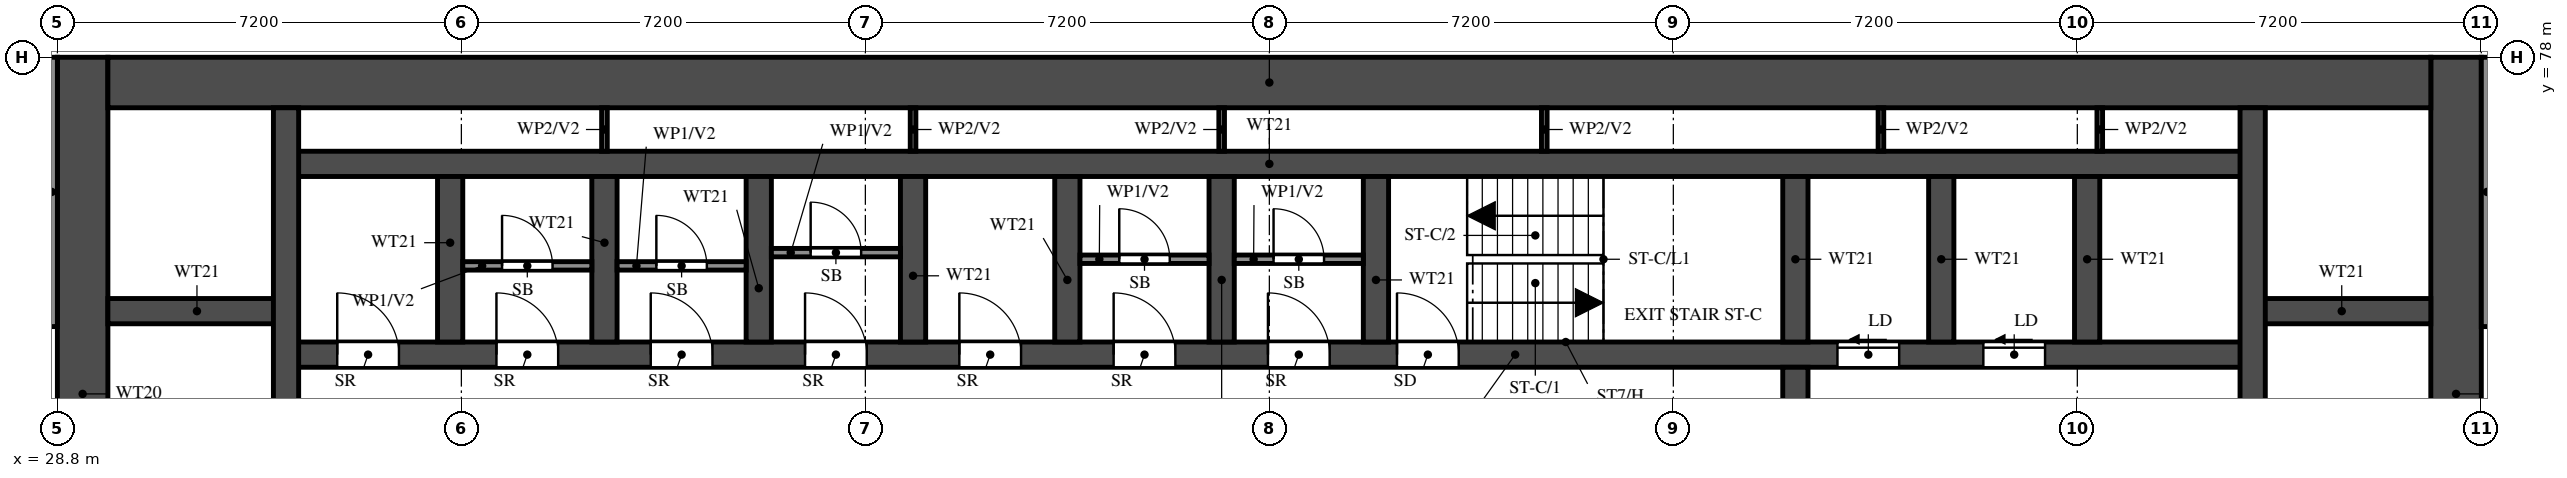
"""IFC4 building model, lengths in metres.
Left out: names, types, materials, properties, quantities, classifications, styles, units other than length and angle.
Written with IfcOpenShell. Run it as: python <this file> out.ifc"""

import sys

from ifc_helpers import new_model, si_unit, direction, frame, frame_2d, origin, place, context, subcontext, project, spatial, rectangle, extrude, element, fill, save


model = new_model("IFC4")
c1 = context("Model", 3, precision=1e-05, world=origin(), true_north=direction((0.0, 1.0)))
c2 = subcontext(c1, "Body", "Model", "MODEL_VIEW")
j1 = project(units=[si_unit("LENGTHUNIT", "METRE"), si_unit("PLANEANGLEUNIT", "RADIAN")], contexts=[c1])
p1 = place(None, origin())
s1 = spatial("IfcSite", under=j1, at=p1, CompositionType="ELEMENT")
p2 = place(p1, origin())
s2 = spatial("IfcBuilding", under=s1, at=p2, CompositionType="ELEMENT")
p3 = place(p2, frame((0.0, 0.0, 51.5)))
s3 = spatial("IfcBuildingStorey", under=s2, at=p3, CompositionType="ELEMENT", Elevation=51.5)
for number, where, z_axis, x_axis in (
    (1, (29.25, 66.0, 0.0), (0.0, 0.0, 1.0), (0.0, 1.0, 0.0)),
    (2, (71.55, 66.0, 0.0), (0.0, 0.0, 1.0), (0.0, 1.0, 0.0)),
):
    element("IfcWall", number, at=place(p3, frame(where, z_axis=z_axis, x_axis=x_axis)), inside=s3, PredefinedType="SHEAR", context=c2, shape_type="SweptSolid", body=[
        extrude(rectangle(XDim=12.0, YDim=0.9, at=frame_2d((6.0, 0.0))), origin(), (0.0, 0.0, 1.0), 3.18),
    ])
p4 = place(p3, frame((29.7, 77.55, 0.0), z_axis=(0.0, 0.0, 1.0), x_axis=(1.0, 0.0, 0.0)))
e3 = element("IfcWall", 3, at=p4, inside=s3, PredefinedType="SHEAR", context=c2, shape_type="SweptSolid", body=[
    extrude(rectangle(XDim=41.4, YDim=0.9, at=frame_2d((20.7, 0.0))), origin(), (0.0, 0.0, 1.0), 3.18),
])
p5 = place(p3, frame((32.875, 72.7, 0.0), z_axis=(0.0, 0.0, 1.0), x_axis=(1.0, 0.0, 0.0)))
e4 = element("IfcWall", 4, at=p5, inside=s3, PredefinedType="SHEAR", context=c2, shape_type="SweptSolid", body=[
    extrude(rectangle(XDim=35.05, YDim=0.45, at=frame_2d((17.525, 0.0))), origin(), (0.0, 0.0, 1.0), 3.18),
])
p6 = place(p5, frame((19.8, 0.0, 0.0)))
e5 = element("IfcOpeningElement", 5, at=p6, cuts=e4, PredefinedType="OPENING", context=c2, shape_type="SweptSolid", body=[
    extrude(rectangle(XDim=1.1, YDim=2.1, at=frame_2d((0.55, 1.05))), frame((0.0, 0.235, 0.0), z_axis=(0.0, -1.0, 0.0), x_axis=(1.0, 0.0, 0.0)), (0.0, 0.0, 1.0), 0.47),
])
p7 = place(p5, frame((27.65, 0.0, 0.0)))
e6 = element("IfcOpeningElement", 6, at=p7, cuts=e4, PredefinedType="OPENING", context=c2, shape_type="SweptSolid", body=[
    extrude(rectangle(XDim=1.1, YDim=2.1, at=frame_2d((0.55, 1.05))), frame((0.0, 0.235, 0.0), z_axis=(0.0, -1.0, 0.0), x_axis=(1.0, 0.0, 0.0)), (0.0, 0.0, 1.0), 0.47),
])
p8 = place(p5, frame((30.25, 0.0, 0.0)))
e7 = element("IfcOpeningElement", 7, at=p8, cuts=e4, PredefinedType="OPENING", context=c2, shape_type="SweptSolid", body=[
    extrude(rectangle(XDim=1.1, YDim=2.1, at=frame_2d((0.55, 1.05))), frame((0.0, 0.235, 0.0), z_axis=(0.0, -1.0, 0.0), x_axis=(1.0, 0.0, 0.0)), (0.0, 0.0, 1.0), 0.47),
])
p9 = place(p5, frame((3.75, 0.0, 0.0)))
e8 = element("IfcOpeningElement", 8, at=p9, cuts=e4, PredefinedType="OPENING", context=c2, shape_type="SweptSolid", body=[
    extrude(rectangle(XDim=1.1, YDim=2.1, at=frame_2d((0.55, 1.05))), frame((0.0, 0.235, 0.0), z_axis=(0.0, -1.0, 0.0), x_axis=(1.0, 0.0, 0.0)), (0.0, 0.0, 1.0), 0.47),
])
p10 = place(p5, frame((6.5, 0.0, 0.0)))
e9 = element("IfcOpeningElement", 9, at=p10, cuts=e4, PredefinedType="OPENING", context=c2, shape_type="SweptSolid", body=[
    extrude(rectangle(XDim=1.1, YDim=2.1, at=frame_2d((0.55, 1.05))), frame((0.0, 0.235, 0.0), z_axis=(0.0, -1.0, 0.0), x_axis=(1.0, 0.0, 0.0)), (0.0, 0.0, 1.0), 0.47),
])
p11 = place(p5, frame((9.25, 0.0, 0.0)))
e10 = element("IfcOpeningElement", 10, at=p11, cuts=e4, PredefinedType="OPENING", context=c2, shape_type="SweptSolid", body=[
    extrude(rectangle(XDim=1.1, YDim=2.1, at=frame_2d((0.55, 1.05))), frame((0.0, 0.235, 0.0), z_axis=(0.0, -1.0, 0.0), x_axis=(1.0, 0.0, 0.0)), (0.0, 0.0, 1.0), 0.47),
])
p12 = place(p5, frame((12.0, 0.0, 0.0)))
e11 = element("IfcOpeningElement", 11, at=p12, cuts=e4, PredefinedType="OPENING", context=c2, shape_type="SweptSolid", body=[
    extrude(rectangle(XDim=1.1, YDim=2.1, at=frame_2d((0.55, 1.05))), frame((0.0, 0.235, 0.0), z_axis=(0.0, -1.0, 0.0), x_axis=(1.0, 0.0, 0.0)), (0.0, 0.0, 1.0), 0.47),
])
p13 = place(p5, frame((14.75, 0.0, 0.0)))
e12 = element("IfcOpeningElement", 12, at=p13, cuts=e4, PredefinedType="OPENING", context=c2, shape_type="SweptSolid", body=[
    extrude(rectangle(XDim=1.1, YDim=2.1, at=frame_2d((0.55, 1.05))), frame((0.0, 0.235, 0.0), z_axis=(0.0, -1.0, 0.0), x_axis=(1.0, 0.0, 0.0)), (0.0, 0.0, 1.0), 0.47),
])
p14 = place(p5, frame((17.5, 0.0, 0.0)))
e13 = element("IfcOpeningElement", 13, at=p14, cuts=e4, PredefinedType="OPENING", context=c2, shape_type="SweptSolid", body=[
    extrude(rectangle(XDim=1.1, YDim=2.1, at=frame_2d((0.55, 1.05))), frame((0.0, 0.235, 0.0), z_axis=(0.0, -1.0, 0.0), x_axis=(1.0, 0.0, 0.0)), (0.0, 0.0, 1.0), 0.47),
])
p15 = place(p5, frame((0.913, 0.0, 0.0)))
e14 = element("IfcOpeningElement", 14, at=p15, cuts=e4, PredefinedType="OPENING", context=c2, shape_type="SweptSolid", body=[
    extrude(rectangle(XDim=1.1, YDim=2.1, at=frame_2d((0.55, 1.05))), frame((0.0, 0.235, 0.0), z_axis=(0.0, -1.0, 0.0), x_axis=(1.0, 0.0, 0.0)), (0.0, 0.0, 1.0), 0.47),
])
p16 = place(p3, frame((32.875, 76.1, 0.0), z_axis=(0.0, 0.0, 1.0), x_axis=(1.0, 0.0, 0.0)))
e15 = element("IfcWall", 15, at=p16, inside=s3, PredefinedType="SHEAR", context=c2, shape_type="SweptSolid", body=[
    extrude(rectangle(XDim=35.05, YDim=0.45, at=frame_2d((17.525, 0.0))), origin(), (0.0, 0.0, 1.0), 3.18),
])
for number, where, z_axis, x_axis in (
    (16, (29.7, 73.475, 0.0), (0.0, 0.0, 1.0), (1.0, 0.0, 0.0)),
    (17, (67.925, 73.475, 0.0), (0.0, 0.0, 1.0), (1.0, 0.0, 0.0)),
):
    element("IfcWall", number, at=place(p3, frame(where, z_axis=z_axis, x_axis=x_axis)), inside=s3, PredefinedType="SHEAR", context=c2, shape_type="SweptSolid", body=[
        extrude(rectangle(XDim=3.175, YDim=0.45, at=frame_2d((1.587, 0.0))), origin(), (0.0, 0.0, 1.0), 3.18),
    ])
p17 = place(p3, frame((32.875, 66.45, 0.0), z_axis=(0.0, 0.0, 1.0), x_axis=(0.0, 1.0, 0.0)))
e18 = element("IfcWall", 18, at=p17, inside=s3, PredefinedType="SHEAR", context=c2, shape_type="SweptSolid", body=[
    extrude(rectangle(XDim=10.65, YDim=0.45, at=frame_2d((5.325, 0.0))), origin(), (0.0, 0.0, 1.0), 3.18),
])
p18 = place(p3, frame((67.925, 66.45, 0.0), z_axis=(0.0, 0.0, 1.0), x_axis=(0.0, 1.0, 0.0)))
e19 = element("IfcWall", 19, at=p18, inside=s3, PredefinedType="SHEAR", context=c2, shape_type="SweptSolid", body=[
    extrude(rectangle(XDim=10.65, YDim=0.45, at=frame_2d((5.325, 0.0))), origin(), (0.0, 0.0, 1.0), 3.18),
])
p19 = place(p18, frame((0.15, 0.0, 0.0)))
e20 = element("IfcOpeningElement", 20, at=p19, cuts=e19, PredefinedType="OPENING", context=c2, shape_type="SweptSolid", body=[
    extrude(rectangle(XDim=1.1, YDim=2.1, at=frame_2d((0.55, 1.05))), frame((0.0, 0.235, 0.0), z_axis=(0.0, -1.0, 0.0), x_axis=(1.0, 0.0, 0.0)), (0.0, 0.0, 1.0), 0.47),
])
p20 = place(p3, frame((59.775, 66.45, 0.0), z_axis=(0.0, 0.0, 1.0), x_axis=(0.0, 1.0, 0.0)))
e21 = element("IfcWall", 21, at=p20, inside=s3, PredefinedType="SHEAR", context=c2, shape_type="SweptSolid", body=[
    extrude(rectangle(XDim=6.025, YDim=0.45, at=frame_2d((3.013, 0.0))), origin(), (0.0, 0.0, 1.0), 3.18),
])
p21 = place(p20, frame((3.85, 0.0, 0.0)))
e22 = element("IfcOpeningElement", 22, at=p21, cuts=e21, PredefinedType="OPENING", context=c2, shape_type="SweptSolid", body=[
    extrude(rectangle(XDim=1.2, YDim=2.1, at=frame_2d((0.6, 1.05))), frame((0.0, 0.235, 0.0), z_axis=(0.0, -1.0, 0.0), x_axis=(1.0, 0.0, 0.0)), (0.0, 0.0, 1.0), 0.47),
])
for number, where, z_axis, x_axis in (
    (23, (59.775, 72.925, 0.0), (0.0, 0.0, 1.0), (0.0, 1.0, 0.0)),
    (24, (35.8, 72.925, 0.0), (0.0, 0.0, 1.0), (0.0, 1.0, 0.0)),
    (25, (38.55, 72.925, 0.0), (0.0, 0.0, 1.0), (0.0, 1.0, 0.0)),
    (26, (41.3, 72.925, 0.0), (0.0, 0.0, 1.0), (0.0, 1.0, 0.0)),
    (27, (44.05, 72.925, 0.0), (0.0, 0.0, 1.0), (0.0, 1.0, 0.0)),
    (28, (46.8, 72.925, 0.0), (0.0, 0.0, 1.0), (0.0, 1.0, 0.0)),
    (29, (49.55, 72.925, 0.0), (0.0, 0.0, 1.0), (0.0, 1.0, 0.0)),
    (30, (52.3, 72.925, 0.0), (0.0, 0.0, 1.0), (0.0, 1.0, 0.0)),
    (31, (62.375, 72.925, 0.0), (0.0, 0.0, 1.0), (0.0, 1.0, 0.0)),
    (32, (64.975, 72.925, 0.0), (0.0, 0.0, 1.0), (0.0, 1.0, 0.0)),
):
    element("IfcWall", number, at=place(p3, frame(where, z_axis=z_axis, x_axis=x_axis)), inside=s3, PredefinedType="SHEAR", context=c2, shape_type="SweptSolid", body=[
        extrude(rectangle(XDim=2.95, YDim=0.45, at=frame_2d((1.475, 0.0))), origin(), (0.0, 0.0, 1.0), 3.18),
    ])
p22 = place(p3, frame((36.025, 74.282, 0.0), z_axis=(0.0, 0.0, 1.0), x_axis=(1.0, 0.0, 0.0)))
e33 = element("IfcWall", 33, at=p22, inside=s3, PredefinedType="PARTITIONING", context=c2, shape_type="SweptSolid", body=[
    extrude(rectangle(XDim=2.3, YDim=0.15, at=frame_2d((1.15, 0.0))), origin(), (0.0, 0.0, 1.0), 3.18),
])
p23 = place(p22, frame((0.7, 0.0, 0.0)))
e34 = element("IfcOpeningElement", 34, at=p23, cuts=e33, PredefinedType="OPENING", context=c2, shape_type="SweptSolid", body=[
    extrude(rectangle(XDim=0.9, YDim=2.1, at=frame_2d((0.45, 1.05))), frame((0.0, 0.085, 0.0), z_axis=(0.0, -1.0, 0.0), x_axis=(1.0, 0.0, 0.0)), (0.0, 0.0, 1.0), 0.17),
])
p24 = place(p3, frame((38.775, 74.282, 0.0), z_axis=(0.0, 0.0, 1.0), x_axis=(1.0, 0.0, 0.0)))
e35 = element("IfcWall", 35, at=p24, inside=s3, PredefinedType="PARTITIONING", context=c2, shape_type="SweptSolid", body=[
    extrude(rectangle(XDim=2.3, YDim=0.15, at=frame_2d((1.15, 0.0))), origin(), (0.0, 0.0, 1.0), 3.18),
])
p25 = place(p24, frame((0.7, 0.0, 0.0)))
e36 = element("IfcOpeningElement", 36, at=p25, cuts=e35, PredefinedType="OPENING", context=c2, shape_type="SweptSolid", body=[
    extrude(rectangle(XDim=0.9, YDim=2.1, at=frame_2d((0.45, 1.05))), frame((0.0, 0.085, 0.0), z_axis=(0.0, -1.0, 0.0), x_axis=(1.0, 0.0, 0.0)), (0.0, 0.0, 1.0), 0.17),
])
p26 = place(p3, frame((41.525, 74.518, 0.0), z_axis=(0.0, 0.0, 1.0), x_axis=(1.0, 0.0, 0.0)))
e37 = element("IfcWall", 37, at=p26, inside=s3, PredefinedType="PARTITIONING", context=c2, shape_type="SweptSolid", body=[
    extrude(rectangle(XDim=2.3, YDim=0.15, at=frame_2d((1.15, 0.0))), origin(), (0.0, 0.0, 1.0), 3.18),
])
p27 = place(p26, frame((0.7, 0.0, 0.0)))
e38 = element("IfcOpeningElement", 38, at=p27, cuts=e37, PredefinedType="OPENING", context=c2, shape_type="SweptSolid", body=[
    extrude(rectangle(XDim=0.9, YDim=2.1, at=frame_2d((0.45, 1.05))), frame((0.0, 0.085, 0.0), z_axis=(0.0, -1.0, 0.0), x_axis=(1.0, 0.0, 0.0)), (0.0, 0.0, 1.0), 0.17),
])
p28 = place(p3, frame((47.025, 74.4, 0.0), z_axis=(0.0, 0.0, 1.0), x_axis=(1.0, 0.0, 0.0)))
e39 = element("IfcWall", 39, at=p28, inside=s3, PredefinedType="PARTITIONING", context=c2, shape_type="SweptSolid", body=[
    extrude(rectangle(XDim=2.3, YDim=0.15, at=frame_2d((1.15, 0.0))), origin(), (0.0, 0.0, 1.0), 3.18),
])
p29 = place(p28, frame((0.7, 0.0, 0.0)))
e40 = element("IfcOpeningElement", 40, at=p29, cuts=e39, PredefinedType="OPENING", context=c2, shape_type="SweptSolid", body=[
    extrude(rectangle(XDim=0.9, YDim=2.1, at=frame_2d((0.45, 1.05))), frame((0.0, 0.085, 0.0), z_axis=(0.0, -1.0, 0.0), x_axis=(1.0, 0.0, 0.0)), (0.0, 0.0, 1.0), 0.17),
])
p30 = place(p3, frame((49.775, 74.4, 0.0), z_axis=(0.0, 0.0, 1.0), x_axis=(1.0, 0.0, 0.0)))
e41 = element("IfcWall", 41, at=p30, inside=s3, PredefinedType="PARTITIONING", context=c2, shape_type="SweptSolid", body=[
    extrude(rectangle(XDim=2.3, YDim=0.15, at=frame_2d((1.15, 0.0))), origin(), (0.0, 0.0, 1.0), 3.18),
])
p31 = place(p30, frame((0.7, 0.0, 0.0)))
e42 = element("IfcOpeningElement", 42, at=p31, cuts=e41, PredefinedType="OPENING", context=c2, shape_type="SweptSolid", body=[
    extrude(rectangle(XDim=0.9, YDim=2.1, at=frame_2d((0.45, 1.05))), frame((0.0, 0.085, 0.0), z_axis=(0.0, -1.0, 0.0), x_axis=(1.0, 0.0, 0.0)), (0.0, 0.0, 1.0), 0.17),
])
for number, where, z_axis, x_axis in (
    (43, (38.55, 76.325, 0.0), (0.0, 0.0, 1.0), (0.0, 1.0, 0.0)),
    (44, (44.05, 76.325, 0.0), (0.0, 0.0, 1.0), (0.0, 1.0, 0.0)),
    (45, (49.55, 76.325, 0.0), (0.0, 0.0, 1.0), (0.0, 1.0, 0.0)),
    (46, (55.3, 76.325, 0.0), (0.0, 0.0, 1.0), (0.0, 1.0, 0.0)),
    (47, (61.3, 76.325, 0.0), (0.0, 0.0, 1.0), (0.0, 1.0, 0.0)),
    (48, (65.2, 76.325, 0.0), (0.0, 0.0, 1.0), (0.0, 1.0, 0.0)),
):
    element("IfcWall", number, at=place(p3, frame(where, z_axis=z_axis, x_axis=x_axis)), inside=s3, PredefinedType="PARTITIONING", context=c2, shape_type="SweptSolid", body=[
        extrude(rectangle(XDim=0.775, YDim=0.1, at=frame_2d((0.388, 0.0))), origin(), (0.0, 0.0, 1.0), 3.18),
    ])
for number, where, z_axis, x_axis in (
    (49, (28.7, 73.2, 0.0), (0.0, 0.0, 1.0), (0.0, 1.0, 0.0)),
    (50, (72.1, 73.2, 0.0), (0.0, 0.0, 1.0), (0.0, 1.0, 0.0)),
):
    element("IfcWall", number, at=place(p3, frame(where, z_axis=z_axis, x_axis=x_axis)), inside=s3, PredefinedType="SOLIDWALL", context=c2, shape_type="SweptSolid", body=[
        extrude(rectangle(XDim=4.8, YDim=0.2, at=frame_2d((2.4, 0.0))), origin(), (0.0, 0.0, 1.0), 3.18),
    ])
p32 = place(p6, origin())
e51 = element("IfcDoor", 51, at=p32, inside=s3, OperationType="SINGLE_SWING_LEFT", PredefinedType="DOOR", context=c2, shape_type="SweptSolid", body=[
    extrude(rectangle(XDim=1.1, YDim=2.1, at=frame_2d((0.55, 1.05))), frame((0.0, 0.025, 0.0), z_axis=(0.0, -1.0, 0.0), x_axis=(1.0, 0.0, 0.0)), (0.0, 0.0, 1.0), 0.05),
])
fill(e5, e51)
p33 = place(p7, origin())
e52 = element("IfcDoor", 52, at=p33, inside=s3, OperationType="SLIDING_TO_LEFT", PredefinedType="DOOR", context=c2, shape_type="SweptSolid", body=[
    extrude(rectangle(XDim=1.1, YDim=2.1, at=frame_2d((0.55, 1.05))), frame((0.0, 0.025, 0.0), z_axis=(0.0, -1.0, 0.0), x_axis=(1.0, 0.0, 0.0)), (0.0, 0.0, 1.0), 0.05),
])
fill(e6, e52)
p34 = place(p8, origin())
e53 = element("IfcDoor", 53, at=p34, inside=s3, OperationType="SLIDING_TO_LEFT", PredefinedType="DOOR", context=c2, shape_type="SweptSolid", body=[
    extrude(rectangle(XDim=1.1, YDim=2.1, at=frame_2d((0.55, 1.05))), frame((0.0, 0.025, 0.0), z_axis=(0.0, -1.0, 0.0), x_axis=(1.0, 0.0, 0.0)), (0.0, 0.0, 1.0), 0.05),
])
fill(e7, e53)
p35 = place(p9, origin())
e54 = element("IfcDoor", 54, at=p35, inside=s3, OperationType="SINGLE_SWING_LEFT", PredefinedType="DOOR", context=c2, shape_type="SweptSolid", body=[
    extrude(rectangle(XDim=1.1, YDim=2.1, at=frame_2d((0.55, 1.05))), frame((0.0, 0.025, 0.0), z_axis=(0.0, -1.0, 0.0), x_axis=(1.0, 0.0, 0.0)), (0.0, 0.0, 1.0), 0.05),
])
fill(e8, e54)
p36 = place(p23, origin())
e55 = element("IfcDoor", 55, at=p36, inside=s3, OperationType="SINGLE_SWING_LEFT", PredefinedType="DOOR", context=c2, shape_type="SweptSolid", body=[
    extrude(rectangle(XDim=0.9, YDim=2.1, at=frame_2d((0.45, 1.05))), frame((0.0, 0.025, 0.0), z_axis=(0.0, -1.0, 0.0), x_axis=(1.0, 0.0, 0.0)), (0.0, 0.0, 1.0), 0.05),
])
fill(e34, e55)
p37 = place(p10, origin())
e56 = element("IfcDoor", 56, at=p37, inside=s3, OperationType="SINGLE_SWING_LEFT", PredefinedType="DOOR", context=c2, shape_type="SweptSolid", body=[
    extrude(rectangle(XDim=1.1, YDim=2.1, at=frame_2d((0.55, 1.05))), frame((0.0, 0.025, 0.0), z_axis=(0.0, -1.0, 0.0), x_axis=(1.0, 0.0, 0.0)), (0.0, 0.0, 1.0), 0.05),
])
fill(e9, e56)
p38 = place(p25, origin())
e57 = element("IfcDoor", 57, at=p38, inside=s3, OperationType="SINGLE_SWING_RIGHT", PredefinedType="DOOR", context=c2, shape_type="SweptSolid", body=[
    extrude(rectangle(XDim=0.9, YDim=2.1, at=frame_2d((0.45, 1.05))), frame((0.0, 0.025, 0.0), z_axis=(0.0, -1.0, 0.0), x_axis=(1.0, 0.0, 0.0)), (0.0, 0.0, 1.0), 0.05),
])
fill(e36, e57)
p39 = place(p11, origin())
e58 = element("IfcDoor", 58, at=p39, inside=s3, OperationType="SINGLE_SWING_LEFT", PredefinedType="DOOR", context=c2, shape_type="SweptSolid", body=[
    extrude(rectangle(XDim=1.1, YDim=2.1, at=frame_2d((0.55, 1.05))), frame((0.0, 0.025, 0.0), z_axis=(0.0, -1.0, 0.0), x_axis=(1.0, 0.0, 0.0)), (0.0, 0.0, 1.0), 0.05),
])
fill(e10, e58)
p40 = place(p27, origin())
e59 = element("IfcDoor", 59, at=p40, inside=s3, OperationType="SINGLE_SWING_RIGHT", PredefinedType="DOOR", context=c2, shape_type="SweptSolid", body=[
    extrude(rectangle(XDim=0.9, YDim=2.1, at=frame_2d((0.45, 1.05))), frame((0.0, 0.025, 0.0), z_axis=(0.0, -1.0, 0.0), x_axis=(1.0, 0.0, 0.0)), (0.0, 0.0, 1.0), 0.05),
])
fill(e38, e59)
p41 = place(p12, origin())
e60 = element("IfcDoor", 60, at=p41, inside=s3, OperationType="SINGLE_SWING_LEFT", PredefinedType="DOOR", context=c2, shape_type="SweptSolid", body=[
    extrude(rectangle(XDim=1.1, YDim=2.1, at=frame_2d((0.55, 1.05))), frame((0.0, 0.025, 0.0), z_axis=(0.0, -1.0, 0.0), x_axis=(1.0, 0.0, 0.0)), (0.0, 0.0, 1.0), 0.05),
])
fill(e11, e60)
p42 = place(p13, origin())
e61 = element("IfcDoor", 61, at=p42, inside=s3, OperationType="SINGLE_SWING_LEFT", PredefinedType="DOOR", context=c2, shape_type="SweptSolid", body=[
    extrude(rectangle(XDim=1.1, YDim=2.1, at=frame_2d((0.55, 1.05))), frame((0.0, 0.025, 0.0), z_axis=(0.0, -1.0, 0.0), x_axis=(1.0, 0.0, 0.0)), (0.0, 0.0, 1.0), 0.05),
])
fill(e12, e61)
p43 = place(p29, origin())
e62 = element("IfcDoor", 62, at=p43, inside=s3, OperationType="SINGLE_SWING_LEFT", PredefinedType="DOOR", context=c2, shape_type="SweptSolid", body=[
    extrude(rectangle(XDim=0.9, YDim=2.1, at=frame_2d((0.45, 1.05))), frame((0.0, 0.025, 0.0), z_axis=(0.0, -1.0, 0.0), x_axis=(1.0, 0.0, 0.0)), (0.0, 0.0, 1.0), 0.05),
])
fill(e40, e62)
p44 = place(p14, origin())
e63 = element("IfcDoor", 63, at=p44, inside=s3, OperationType="SINGLE_SWING_LEFT", PredefinedType="DOOR", context=c2, shape_type="SweptSolid", body=[
    extrude(rectangle(XDim=1.1, YDim=2.1, at=frame_2d((0.55, 1.05))), frame((0.0, 0.025, 0.0), z_axis=(0.0, -1.0, 0.0), x_axis=(1.0, 0.0, 0.0)), (0.0, 0.0, 1.0), 0.05),
])
fill(e13, e63)
p45 = place(p31, origin())
e64 = element("IfcDoor", 64, at=p45, inside=s3, OperationType="SINGLE_SWING_RIGHT", PredefinedType="DOOR", context=c2, shape_type="SweptSolid", body=[
    extrude(rectangle(XDim=0.9, YDim=2.1, at=frame_2d((0.45, 1.05))), frame((0.0, 0.025, 0.0), z_axis=(0.0, -1.0, 0.0), x_axis=(1.0, 0.0, 0.0)), (0.0, 0.0, 1.0), 0.05),
])
fill(e42, e64)
p46 = place(p15, origin())
e65 = element("IfcDoor", 65, at=p46, inside=s3, OperationType="SINGLE_SWING_LEFT", PredefinedType="DOOR", context=c2, shape_type="SweptSolid", body=[
    extrude(rectangle(XDim=1.1, YDim=2.1, at=frame_2d((0.55, 1.05))), frame((0.0, 0.025, 0.0), z_axis=(0.0, -1.0, 0.0), x_axis=(1.0, 0.0, 0.0)), (0.0, 0.0, 1.0), 0.05),
])
fill(e14, e65)
save(model, sys.argv[1])
